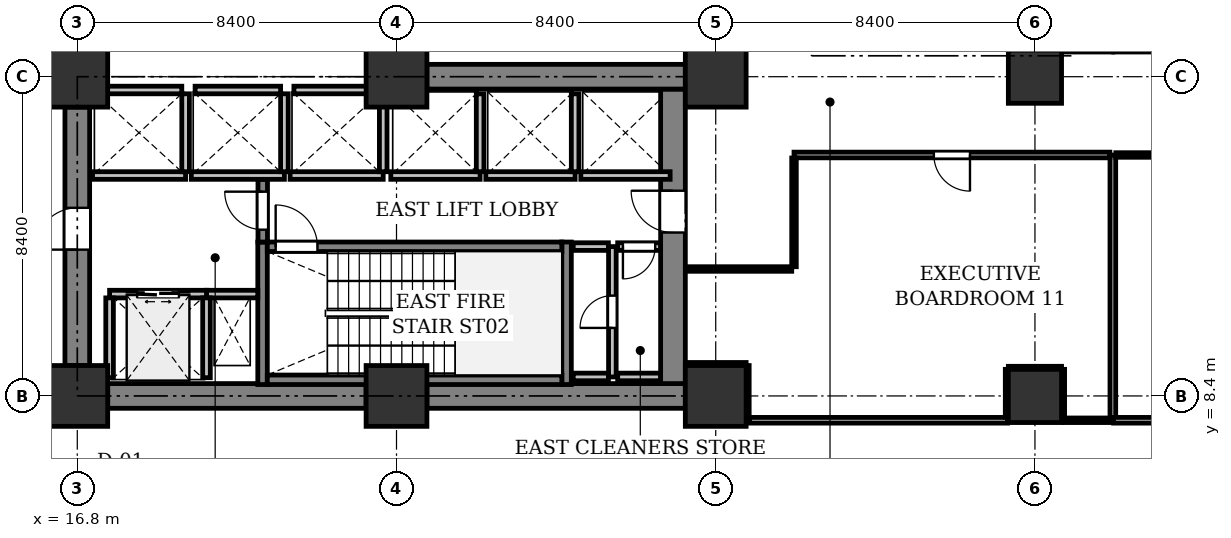
"""IFC4 building model, lengths in metres.
Left out: names, types, materials, properties, quantities, classifications, styles, units other than length and angle.
Written with IfcOpenShell. Run it as: python <this file> out.ifc"""

import sys

from ifc_helpers import new_model, si_unit, direction, frame, frame_2d, origin, origin_2d, place, context, subcontext, project, spatial, rectangle, extrude, element, fill, save


model = new_model("IFC4")
c1 = context("Model", 3, precision=1e-05, world=origin(), true_north=direction((0.0, 1.0)))
c2 = subcontext(c1, "Body", "Model", "MODEL_VIEW")
j1 = project(units=[si_unit("LENGTHUNIT", "METRE"), si_unit("PLANEANGLEUNIT", "RADIAN")], contexts=[c1])
p1 = place(None, origin())
s1 = spatial("IfcSite", under=j1, at=p1, CompositionType="ELEMENT")
p2 = place(p1, origin())
s2 = spatial("IfcBuilding", under=s1, at=p2, CompositionType="ELEMENT")
p3 = place(p2, frame((0.0, 0.0, 10.2)))
s3 = spatial("IfcBuildingStorey", under=s2, at=p3, CompositionType="ELEMENT", Elevation=10.2)
for number, where, z_axis, x_axis in (
    (1, (16.8, 8.4, 0.0), (0.0, 0.0, 1.0), (1.0, 0.0, 0.0)),
    (2, (16.8, 16.8, 0.0), (0.0, 0.0, 1.0), (1.0, 0.0, 0.0)),
    (3, (25.2, 8.4, 0.0), (0.0, 0.0, 1.0), (1.0, 0.0, 0.0)),
    (4, (25.2, 16.8, 0.0), (0.0, 0.0, 1.0), (1.0, 0.0, 0.0)),
    (5, (33.6, 8.4, 0.0), (0.0, 0.0, 1.0), (1.0, 0.0, 0.0)),
    (6, (33.6, 16.8, 0.0), (0.0, 0.0, 1.0), (1.0, 0.0, 0.0)),
):
    element("IfcColumn", number, at=place(p3, frame(where, z_axis=z_axis, x_axis=x_axis)), inside=s3, PredefinedType="COLUMN", context=c2, shape_type="SweptSolid", body=[
        extrude(rectangle(XDim=1.6, YDim=1.6, at=origin_2d()), origin(), (0.0, 0.0, 1.0), 4.8),
    ])
for number, where, z_axis, x_axis in (
    (7, (42.0, 8.4, 0.0), (0.0, 0.0, 1.0), (1.0, 0.0, 0.0)),
    (8, (42.0, 16.8, 0.0), (0.0, 0.0, 1.0), (1.0, 0.0, 0.0)),
):
    element("IfcColumn", number, at=place(p3, frame(where, z_axis=z_axis, x_axis=x_axis)), inside=s3, PredefinedType="COLUMN", context=c2, shape_type="SweptSolid", body=[
        extrude(rectangle(XDim=1.4, YDim=1.4, at=origin_2d()), origin(), (0.0, 0.0, 1.0), 4.8),
    ])
p4 = place(p3, frame((17.6, 8.4, 0.0), z_axis=(0.0, 0.0, 1.0), x_axis=(1.0, 0.0, 0.0)))
e9 = element("IfcWall", 9, at=p4, inside=s3, PredefinedType="SHEAR", context=c2, shape_type="SweptSolid", body=[
    extrude(rectangle(XDim=6.8, YDim=0.65, at=frame_2d((3.4, 0.0))), origin(), (0.0, 0.0, 1.0), 4.525),
])
p5 = place(p3, frame((26.0, 8.4, 0.0), z_axis=(0.0, 0.0, 1.0), x_axis=(1.0, 0.0, 0.0)))
e10 = element("IfcWall", 10, at=p5, inside=s3, PredefinedType="SHEAR", context=c2, shape_type="SweptSolid", body=[
    extrude(rectangle(XDim=6.8, YDim=0.65, at=frame_2d((3.4, 0.0))), origin(), (0.0, 0.0, 1.0), 4.525),
])
p6 = place(p3, frame((32.475, 8.725, 0.0), z_axis=(0.0, 0.0, 1.0), x_axis=(0.0, 1.0, 0.0)))
e11 = element("IfcWall", 11, at=p6, inside=s3, PredefinedType="SHEAR", context=c2, shape_type="SweptSolid", body=[
    extrude(rectangle(XDim=7.75, YDim=0.65, at=frame_2d((3.875, 0.0))), origin(), (0.0, 0.0, 1.0), 4.525),
])
p7 = place(p6, frame((3.975, 0.0, 0.0)))
e12 = element("IfcOpeningElement", 12, at=p7, cuts=e11, PredefinedType="OPENING", context=c2, shape_type="SweptSolid", body=[
    extrude(rectangle(XDim=1.1, YDim=2.15, at=frame_2d((0.55, 1.075))), frame((0.0, 0.335, 0.0), z_axis=(0.0, -1.0, 0.0), x_axis=(1.0, 0.0, 0.0)), (0.0, 0.0, 1.0), 0.67),
])
p8 = place(p3, frame((16.8, 9.2, 0.0), z_axis=(0.0, 0.0, 1.0), x_axis=(0.0, 1.0, 0.0)))
e13 = element("IfcWall", 13, at=p8, inside=s3, PredefinedType="SHEAR", context=c2, shape_type="SweptSolid", body=[
    extrude(rectangle(XDim=6.8, YDim=0.65, at=frame_2d((3.4, 0.0))), origin(), (0.0, 0.0, 1.0), 4.525),
])
p9 = place(p8, frame((3.05, 0.0, 0.0)))
e14 = element("IfcOpeningElement", 14, at=p9, cuts=e13, PredefinedType="OPENING", context=c2, shape_type="SweptSolid", body=[
    extrude(rectangle(XDim=1.1, YDim=2.15, at=frame_2d((0.55, 1.075))), frame((0.0, 0.335, 0.0), z_axis=(0.0, -1.0, 0.0), x_axis=(1.0, 0.0, 0.0)), (0.0, 0.0, 1.0), 0.67),
])
p10 = place(p3, frame((26.0, 16.8, 0.0), z_axis=(0.0, 0.0, 1.0), x_axis=(1.0, 0.0, 0.0)))
e15 = element("IfcWall", 15, at=p10, inside=s3, PredefinedType="SHEAR", context=c2, shape_type="SweptSolid", body=[
    extrude(rectangle(XDim=6.8, YDim=0.65, at=frame_2d((3.4, 0.0))), origin(), (0.0, 0.0, 1.0), 4.525),
])
for number, where, z_axis, x_axis in (
    (16, (21.675, 8.7, 0.0), (0.0, 0.0, 1.0), (0.0, 1.0, 0.0)),
    (17, (29.675, 8.7, 0.0), (0.0, 0.0, 1.0), (0.0, 1.0, 0.0)),
):
    element("IfcWall", number, at=place(p3, frame(where, z_axis=z_axis, x_axis=x_axis)), inside=s3, PredefinedType="SHEAR", context=c2, shape_type="SweptSolid", body=[
        extrude(rectangle(XDim=3.75, YDim=0.25, at=frame_2d((1.875, 0.0))), origin(), (0.0, 0.0, 1.0), 4.525),
    ])
p11 = place(p3, frame((21.8, 8.825, 0.0), z_axis=(0.0, 0.0, 1.0), x_axis=(1.0, 0.0, 0.0)))
e18 = element("IfcWall", 18, at=p11, inside=s3, PredefinedType="SHEAR", context=c2, shape_type="SweptSolid", body=[
    extrude(rectangle(XDim=7.75, YDim=0.25, at=frame_2d((3.875, 0.0))), origin(), (0.0, 0.0, 1.0), 4.525),
])
p12 = place(p3, frame((21.8, 12.325, 0.0), z_axis=(0.0, 0.0, 1.0), x_axis=(1.0, 0.0, 0.0)))
e19 = element("IfcWall", 19, at=p12, inside=s3, PredefinedType="SHEAR", context=c2, shape_type="SweptSolid", body=[
    extrude(rectangle(XDim=7.75, YDim=0.25, at=frame_2d((3.875, 0.0))), origin(), (0.0, 0.0, 1.0), 4.525),
])
p13 = place(p12, frame((0.22, 0.0, 0.0)))
e20 = element("IfcOpeningElement", 20, at=p13, cuts=e19, PredefinedType="OPENING", context=c2, shape_type="SweptSolid", body=[
    extrude(rectangle(XDim=1.1, YDim=2.15, at=frame_2d((0.55, 1.075))), frame((0.0, 0.135, 0.0), z_axis=(0.0, -1.0, 0.0), x_axis=(1.0, 0.0, 0.0)), (0.0, 0.0, 1.0), 0.27),
])
p14 = place(p3, frame((20.2, 11.08, 0.0), z_axis=(0.0, 0.0, 1.0), x_axis=(1.0, 0.0, 0.0)))
e21 = element("IfcWall", 21, at=p14, inside=s3, PredefinedType="PARTITIONING", context=c2, shape_type="SweptSolid", body=[
    extrude(rectangle(XDim=1.35, YDim=0.2, at=frame_2d((0.675, 0.0))), origin(), (0.0, 0.0, 1.0), 4.525),
])
p15 = place(p3, frame((21.68, 12.45, 0.0), z_axis=(0.0, 0.0, 1.0), x_axis=(0.0, 1.0, 0.0)))
e22 = element("IfcWall", 22, at=p15, inside=s3, PredefinedType="SHEAR", context=c2, shape_type="SweptSolid", body=[
    extrude(rectangle(XDim=1.65, YDim=0.25, at=frame_2d((0.825, 0.0))), origin(), (0.0, 0.0, 1.0), 4.525),
])
p16 = place(p15, frame((0.325, 0.0, 0.0)))
e23 = element("IfcOpeningElement", 23, at=p16, cuts=e22, PredefinedType="OPENING", context=c2, shape_type="SweptSolid", body=[
    extrude(rectangle(XDim=1.0, YDim=2.15, at=frame_2d((0.5, 1.075))), frame((0.0, 0.135, 0.0), z_axis=(0.0, -1.0, 0.0), x_axis=(1.0, 0.0, 0.0)), (0.0, 0.0, 1.0), 0.27),
])
p17 = place(p3, frame((17.65, 11.08, 0.0), z_axis=(0.0, 0.0, 1.0), x_axis=(1.0, 0.0, 0.0)))
e24 = element("IfcWall", 24, at=p17, inside=s3, PredefinedType="PARTITIONING", context=c2, shape_type="SweptSolid", body=[
    extrude(rectangle(XDim=2.55, YDim=0.2, at=frame_2d((1.275, 0.0))), origin(), (0.0, 0.0, 1.0), 4.525),
])
p18 = place(p17, frame((0.725, 0.0, 0.0)))
e25 = element("IfcOpeningElement", 25, at=p18, cuts=e24, PredefinedType="OPENING", context=c2, shape_type="SweptSolid", body=[
    extrude(rectangle(XDim=1.1, YDim=2.2, at=frame_2d((0.55, 1.1))), frame((0.0, 0.11, 0.0), z_axis=(0.0, -1.0, 0.0), x_axis=(1.0, 0.0, 0.0)), (0.0, 0.0, 1.0), 0.22),
])
for number, where, z_axis, x_axis in (
    (26, (20.2, 8.88, 0.0), (0.0, 0.0, 1.0), (0.0, 1.0, 0.0)),
    (27, (17.65, 8.88, 0.0), (0.0, 0.0, 1.0), (0.0, 1.0, 0.0)),
):
    element("IfcWall", number, at=place(p3, frame(where, z_axis=z_axis, x_axis=x_axis)), inside=s3, PredefinedType="PARTITIONING", context=c2, shape_type="SweptSolid", body=[
        extrude(rectangle(XDim=2.1, YDim=0.2, at=frame_2d((1.05, 0.0))), origin(), (0.0, 0.0, 1.0), 4.525),
    ])
p19 = place(p3, frame((17.2, 14.2, 0.0), z_axis=(0.0, 0.0, 1.0), x_axis=(1.0, 0.0, 0.0)))
e28 = element("IfcWall", 28, at=p19, inside=s3, PredefinedType="PARTITIONING", context=c2, shape_type="SweptSolid", body=[
    extrude(rectangle(XDim=2.45, YDim=0.2, at=frame_2d((1.225, 0.0))), origin(), (0.0, 0.0, 1.0), 4.525),
])
p20 = place(p3, frame((19.65, 14.3, 0.0), z_axis=(0.0, 0.0, 1.0), x_axis=(0.0, 1.0, 0.0)))
e29 = element("IfcWall", 29, at=p20, inside=s3, PredefinedType="PARTITIONING", context=c2, shape_type="SweptSolid", body=[
    extrude(rectangle(XDim=2.05, YDim=0.2, at=frame_2d((1.025, 0.0))), origin(), (0.0, 0.0, 1.0), 4.525),
])
p21 = place(p3, frame((17.3, 16.45, 0.0), z_axis=(0.0, 0.0, 1.0), x_axis=(1.0, 0.0, 0.0)))
e30 = element("IfcWall", 30, at=p21, inside=s3, PredefinedType="PARTITIONING", context=c2, shape_type="SweptSolid", body=[
    extrude(rectangle(XDim=2.25, YDim=0.2, at=frame_2d((1.125, 0.0))), origin(), (0.0, 0.0, 1.0), 4.525),
])
p22 = place(p3, frame((19.8, 14.2, 0.0), z_axis=(0.0, 0.0, 1.0), x_axis=(1.0, 0.0, 0.0)))
e31 = element("IfcWall", 31, at=p22, inside=s3, PredefinedType="PARTITIONING", context=c2, shape_type="SweptSolid", body=[
    extrude(rectangle(XDim=2.45, YDim=0.2, at=frame_2d((1.225, 0.0))), origin(), (0.0, 0.0, 1.0), 4.525),
])
p23 = place(p3, frame((22.25, 14.3, 0.0), z_axis=(0.0, 0.0, 1.0), x_axis=(0.0, 1.0, 0.0)))
e32 = element("IfcWall", 32, at=p23, inside=s3, PredefinedType="PARTITIONING", context=c2, shape_type="SweptSolid", body=[
    extrude(rectangle(XDim=2.05, YDim=0.2, at=frame_2d((1.025, 0.0))), origin(), (0.0, 0.0, 1.0), 4.525),
])
p24 = place(p3, frame((19.9, 16.45, 0.0), z_axis=(0.0, 0.0, 1.0), x_axis=(1.0, 0.0, 0.0)))
e33 = element("IfcWall", 33, at=p24, inside=s3, PredefinedType="PARTITIONING", context=c2, shape_type="SweptSolid", body=[
    extrude(rectangle(XDim=2.25, YDim=0.2, at=frame_2d((1.125, 0.0))), origin(), (0.0, 0.0, 1.0), 4.525),
])
p25 = place(p3, frame((22.4, 14.2, 0.0), z_axis=(0.0, 0.0, 1.0), x_axis=(1.0, 0.0, 0.0)))
e34 = element("IfcWall", 34, at=p25, inside=s3, PredefinedType="PARTITIONING", context=c2, shape_type="SweptSolid", body=[
    extrude(rectangle(XDim=2.45, YDim=0.2, at=frame_2d((1.225, 0.0))), origin(), (0.0, 0.0, 1.0), 4.525),
])
p26 = place(p3, frame((24.85, 14.3, 0.0), z_axis=(0.0, 0.0, 1.0), x_axis=(0.0, 1.0, 0.0)))
e35 = element("IfcWall", 35, at=p26, inside=s3, PredefinedType="PARTITIONING", context=c2, shape_type="SweptSolid", body=[
    extrude(rectangle(XDim=2.05, YDim=0.2, at=frame_2d((1.025, 0.0))), origin(), (0.0, 0.0, 1.0), 4.525),
])
p27 = place(p3, frame((22.5, 16.45, 0.0), z_axis=(0.0, 0.0, 1.0), x_axis=(1.0, 0.0, 0.0)))
e36 = element("IfcWall", 36, at=p27, inside=s3, PredefinedType="PARTITIONING", context=c2, shape_type="SweptSolid", body=[
    extrude(rectangle(XDim=2.25, YDim=0.2, at=frame_2d((1.125, 0.0))), origin(), (0.0, 0.0, 1.0), 4.525),
])
p28 = place(p3, frame((25.05, 14.2, 0.0), z_axis=(0.0, 0.0, 1.0), x_axis=(1.0, 0.0, 0.0)))
e37 = element("IfcWall", 37, at=p28, inside=s3, PredefinedType="PARTITIONING", context=c2, shape_type="SweptSolid", body=[
    extrude(rectangle(XDim=2.35, YDim=0.2, at=frame_2d((1.175, 0.0))), origin(), (0.0, 0.0, 1.0), 4.525),
])
p29 = place(p3, frame((27.4, 14.3, 0.0), z_axis=(0.0, 0.0, 1.0), x_axis=(0.0, 1.0, 0.0)))
e38 = element("IfcWall", 38, at=p29, inside=s3, PredefinedType="PARTITIONING", context=c2, shape_type="SweptSolid", body=[
    extrude(rectangle(XDim=2.05, YDim=0.2, at=frame_2d((1.025, 0.0))), origin(), (0.0, 0.0, 1.0), 4.525),
])
p30 = place(p3, frame((27.55, 14.2, 0.0), z_axis=(0.0, 0.0, 1.0), x_axis=(1.0, 0.0, 0.0)))
e39 = element("IfcWall", 39, at=p30, inside=s3, PredefinedType="PARTITIONING", context=c2, shape_type="SweptSolid", body=[
    extrude(rectangle(XDim=2.35, YDim=0.2, at=frame_2d((1.175, 0.0))), origin(), (0.0, 0.0, 1.0), 4.525),
])
p31 = place(p3, frame((29.9, 14.3, 0.0), z_axis=(0.0, 0.0, 1.0), x_axis=(0.0, 1.0, 0.0)))
e40 = element("IfcWall", 40, at=p31, inside=s3, PredefinedType="PARTITIONING", context=c2, shape_type="SweptSolid", body=[
    extrude(rectangle(XDim=2.05, YDim=0.2, at=frame_2d((1.025, 0.0))), origin(), (0.0, 0.0, 1.0), 4.525),
])
p32 = place(p3, frame((30.05, 14.2, 0.0), z_axis=(0.0, 0.0, 1.0), x_axis=(1.0, 0.0, 0.0)))
e41 = element("IfcWall", 41, at=p32, inside=s3, PredefinedType="PARTITIONING", context=c2, shape_type="SweptSolid", body=[
    extrude(rectangle(XDim=2.35, YDim=0.2, at=frame_2d((1.175, 0.0))), origin(), (0.0, 0.0, 1.0), 4.525),
])
p33 = place(p3, frame((30.88, 8.9, 0.0), z_axis=(0.0, 0.0, 1.0), x_axis=(0.0, 1.0, 0.0)))
e42 = element("IfcWall", 42, at=p33, inside=s3, PredefinedType="PARTITIONING", context=c2, shape_type="SweptSolid", body=[
    extrude(rectangle(XDim=3.43, YDim=0.2, at=frame_2d((1.715, 0.0))), origin(), (0.0, 0.0, 1.0), 4.525),
])
p34 = place(p33, frame((1.29, 0.0, 0.0)))
e43 = element("IfcOpeningElement", 43, at=p34, cuts=e42, PredefinedType="OPENING", context=c2, shape_type="SweptSolid", body=[
    extrude(rectangle(XDim=0.85, YDim=2.15, at=frame_2d((0.425, 1.075))), frame((0.0, 0.11, 0.0), z_axis=(0.0, -1.0, 0.0), x_axis=(1.0, 0.0, 0.0)), (0.0, 0.0, 1.0), 0.22),
])
for number, where, z_axis, x_axis in (
    (44, (30.776, 12.33, 0.0), (0.0, 0.0, 1.0), (-1.0, 0.0, 0.0)),
    (45, (29.85, 8.9, 0.0), (0.0, 0.0, 1.0), (1.0, 0.0, 0.0)),
):
    element("IfcWall", number, at=place(p3, frame(where, z_axis=z_axis, x_axis=x_axis)), inside=s3, PredefinedType="PARTITIONING", context=c2, shape_type="SweptSolid", body=[
        extrude(rectangle(XDim=0.926, YDim=0.2, at=frame_2d((0.463, 0.0))), origin(), (0.0, 0.0, 1.0), 4.525),
    ])
p35 = place(p3, frame((32.146, 12.33, 0.0), z_axis=(0.0, 0.0, 1.0), x_axis=(-1.0, 0.0, 0.0)))
e46 = element("IfcWall", 46, at=p35, inside=s3, PredefinedType="PARTITIONING", context=c2, shape_type="SweptSolid", body=[
    extrude(rectangle(XDim=1.126, YDim=0.2, at=frame_2d((0.563, 0.0))), origin(), (0.0, 0.0, 1.0), 4.525),
])
p36 = place(p35, frame((0.138, 0.0, 0.0)))
e47 = element("IfcOpeningElement", 47, at=p36, cuts=e46, PredefinedType="OPENING", context=c2, shape_type="SweptSolid", body=[
    extrude(rectangle(XDim=0.85, YDim=2.15, at=frame_2d((0.425, 1.075))), frame((0.0, 0.11, 0.0), z_axis=(0.0, -1.0, 0.0), x_axis=(1.0, 0.0, 0.0)), (0.0, 0.0, 1.0), 0.22),
])
p37 = place(p3, frame((31.02, 8.9, 0.0), z_axis=(0.0, 0.0, 1.0), x_axis=(1.0, 0.0, 0.0)))
e48 = element("IfcWall", 48, at=p37, inside=s3, PredefinedType="PARTITIONING", context=c2, shape_type="SweptSolid", body=[
    extrude(rectangle(XDim=1.126, YDim=0.2, at=frame_2d((0.563, 0.0))), origin(), (0.0, 0.0, 1.0), 4.525),
])
p38 = place(p3, frame((32.804, 9.22, 0.0), z_axis=(0.0, 0.0, 1.0), x_axis=(1.0, 0.0, 0.0)))
e49 = element("IfcWall", 49, at=p38, inside=s3, PredefinedType="PARTITIONING", context=c2, shape_type="SweptSolid", body=[
    extrude(rectangle(XDim=1.596, YDim=0.12, at=frame_2d((0.798, 0.0))), origin(), (0.0, 0.0, 1.0), 3.913),
])
p39 = place(p3, frame((34.42, 9.2, 0.0), z_axis=(0.0, 0.0, 1.0), x_axis=(0.0, -1.0, 0.0)))
e50 = element("IfcWall", 50, at=p39, inside=s3, PredefinedType="PARTITIONING", context=c2, shape_type="SweptSolid", body=[
    extrude(rectangle(XDim=1.44, YDim=0.12, at=frame_2d((0.72, 0.0))), origin(), (0.0, 0.0, 1.0), 3.725),
])
p40 = place(p3, frame((34.484, 7.76, 0.0), z_axis=(0.0, 0.0, 1.0), x_axis=(1.0, 0.0, 0.0)))
e51 = element("IfcWall", 51, at=p40, inside=s3, PredefinedType="PARTITIONING", context=c2, shape_type="SweptSolid", body=[
    extrude(rectangle(XDim=6.796, YDim=0.15, at=frame_2d((3.398, 0.0))), origin(), (0.0, 0.0, 1.0), 4.122),
])
p41 = place(p3, frame((41.28, 7.839, 0.0), z_axis=(0.0, 0.0, 1.0), x_axis=(0.0, 1.0, 0.0)))
e52 = element("IfcWall", 52, at=p41, inside=s3, PredefinedType="PARTITIONING", context=c2, shape_type="SweptSolid", body=[
    extrude(rectangle(XDim=1.261, YDim=0.12, at=frame_2d((0.63, 0.0))), origin(), (0.0, 0.0, 1.0), 3.725),
])
p42 = place(p3, frame((41.3, 9.12, 0.0), z_axis=(0.0, 0.0, 1.0), x_axis=(1.0, 0.0, 0.0)))
e53 = element("IfcWall", 53, at=p42, inside=s3, PredefinedType="PARTITIONING", context=c2, shape_type="SweptSolid", body=[
    extrude(rectangle(XDim=1.4, YDim=0.12, at=frame_2d((0.7, 0.0))), origin(), (0.0, 0.0, 1.0), 3.913),
])
p43 = place(p3, frame((42.72, 9.1, 0.0), z_axis=(0.0, 0.0, 1.0), x_axis=(0.0, -1.0, 0.0)))
e54 = element("IfcWall", 54, at=p43, inside=s3, PredefinedType="PARTITIONING", context=c2, shape_type="SweptSolid", body=[
    extrude(rectangle(XDim=1.34, YDim=0.12, at=frame_2d((0.67, 0.0))), origin(), (0.0, 0.0, 1.0), 3.725),
])
p44 = place(p3, frame((42.784, 7.76, 0.0), z_axis=(0.0, 0.0, 1.0), x_axis=(1.0, 0.0, 0.0)))
e55 = element("IfcWall", 55, at=p44, inside=s3, PredefinedType="PARTITIONING", context=c2, shape_type="SweptSolid", body=[
    extrude(rectangle(XDim=1.266, YDim=0.12, at=frame_2d((0.633, 0.0))), origin(), (0.0, 0.0, 1.0), 4.525),
])
p45 = place(p3, frame((44.05, 7.824, 0.0), z_axis=(0.0, 0.0, 1.0), x_axis=(0.0, 1.0, 0.0)))
e56 = element("IfcWall", 56, at=p45, inside=s3, PredefinedType="PARTITIONING", context=c2, shape_type="SweptSolid", body=[
    extrude(rectangle(XDim=6.916, YDim=0.15, at=frame_2d((3.458, 0.0))), origin(), (0.0, 0.0, 1.0), 3.725),
])
p46 = place(p3, frame((43.971, 14.74, 0.0), z_axis=(0.0, 0.0, 1.0), x_axis=(-1.0, 0.0, 0.0)))
e57 = element("IfcWall", 57, at=p46, inside=s3, PredefinedType="PARTITIONING", context=c2, shape_type="SweptSolid", body=[
    extrude(rectangle(XDim=8.311, YDim=0.15, at=frame_2d((4.156, 0.0))), origin(), (0.0, 0.0, 1.0), 3.913),
])
p47 = place(p46, frame((3.68, 0.0, 0.0)))
e58 = element("IfcOpeningElement", 58, at=p47, cuts=e57, PredefinedType="OPENING", context=c2, shape_type="SweptSolid", body=[
    extrude(rectangle(XDim=0.95, YDim=2.15, at=frame_2d((0.475, 1.075))), frame((0.0, 0.085, 0.0), z_axis=(0.0, -1.0, 0.0), x_axis=(1.0, 0.0, 0.0)), (0.0, 0.0, 1.0), 0.17),
])
p48 = place(p3, frame((35.66, 14.661, 0.0), z_axis=(0.0, 0.0, 1.0), x_axis=(0.0, -1.0, 0.0)))
e59 = element("IfcWall", 59, at=p48, inside=s3, PredefinedType="PARTITIONING", context=c2, shape_type="SweptSolid", body=[
    extrude(rectangle(XDim=2.861, YDim=0.12, at=frame_2d((1.43, 0.0))), origin(), (0.0, 0.0, 1.0), 4.525),
])
p49 = place(p3, frame((35.6, 11.74, 0.0), z_axis=(0.0, 0.0, 1.0), x_axis=(-1.0, 0.0, 0.0)))
e60 = element("IfcWall", 60, at=p49, inside=s3, PredefinedType="PARTITIONING", context=c2, shape_type="SweptSolid", body=[
    extrude(rectangle(XDim=2.796, YDim=0.12, at=frame_2d((1.398, 0.0))), origin(), (0.0, 0.0, 1.0), 3.913),
])
p50 = place(p3, frame((45.4, 14.74, 0.0), z_axis=(0.0, 0.0, 1.0), x_axis=(-1.0, 0.0, 0.0)))
e61 = element("IfcWall", 61, at=p50, inside=s3, PredefinedType="PARTITIONING", context=c2, shape_type="SweptSolid", body=[
    extrude(rectangle(XDim=1.271, YDim=0.12, at=frame_2d((0.635, 0.0))), origin(), (0.0, 0.0, 1.0), 4.525),
])
p51 = place(p3, frame((44.07, 7.76, 0.0), z_axis=(0.0, 0.0, 1.0), x_axis=(1.0, 0.0, 0.0)))
e62 = element("IfcWall", 62, at=p51, inside=s3, PredefinedType="PARTITIONING", context=c2, shape_type="SweptSolid", body=[
    extrude(rectangle(XDim=5.61, YDim=0.15, at=frame_2d((2.805, 0.0))), origin(), (0.0, 0.0, 1.0), 4.122),
])
p52 = place(p7, origin())
e63 = element("IfcDoor", 63, at=p52, inside=s3, OperationType="SINGLE_SWING_RIGHT", PredefinedType="DOOR", context=c2, shape_type="SweptSolid", body=[
    extrude(rectangle(XDim=1.1, YDim=2.15, at=frame_2d((0.55, 1.075))), frame((0.0, 0.025, 0.0), z_axis=(0.0, -1.0, 0.0), x_axis=(1.0, 0.0, 0.0)), (0.0, 0.0, 1.0), 0.05),
])
fill(e12, e63)
p53 = place(p9, origin())
e64 = element("IfcDoor", 64, at=p53, inside=s3, OperationType="SINGLE_SWING_LEFT", PredefinedType="DOOR", context=c2, shape_type="SweptSolid", body=[
    extrude(rectangle(XDim=1.1, YDim=2.15, at=frame_2d((0.55, 1.075))), frame((0.0, 0.025, 0.0), z_axis=(0.0, -1.0, 0.0), x_axis=(1.0, 0.0, 0.0)), (0.0, 0.0, 1.0), 0.05),
])
fill(e14, e64)
p54 = place(p13, origin())
e65 = element("IfcDoor", 65, at=p54, inside=s3, OperationType="SINGLE_SWING_LEFT", PredefinedType="DOOR", context=c2, shape_type="SweptSolid", body=[
    extrude(rectangle(XDim=1.1, YDim=2.15, at=frame_2d((0.55, 1.075))), frame((0.0, 0.025, 0.0), z_axis=(0.0, -1.0, 0.0), x_axis=(1.0, 0.0, 0.0)), (0.0, 0.0, 1.0), 0.05),
])
fill(e20, e65)
p55 = place(p16, origin())
e66 = element("IfcDoor", 66, at=p55, inside=s3, OperationType="SINGLE_SWING_RIGHT", PredefinedType="DOOR", context=c2, shape_type="SweptSolid", body=[
    extrude(rectangle(XDim=1.0, YDim=2.15, at=frame_2d((0.5, 1.075))), frame((0.0, 0.025, 0.0), z_axis=(0.0, -1.0, 0.0), x_axis=(1.0, 0.0, 0.0)), (0.0, 0.0, 1.0), 0.05),
])
fill(e23, e66)
p56 = place(p18, origin())
e67 = element("IfcDoor", 67, at=p56, inside=s3, OperationType="DOUBLE_DOOR_SLIDING", PredefinedType="DOOR", context=c2, shape_type="SweptSolid", body=[
    extrude(rectangle(XDim=1.1, YDim=2.2, at=frame_2d((0.55, 1.1))), frame((0.0, 0.025, 0.0), z_axis=(0.0, -1.0, 0.0), x_axis=(1.0, 0.0, 0.0)), (0.0, 0.0, 1.0), 0.05),
])
fill(e25, e67)
p57 = place(p34, origin())
e68 = element("IfcDoor", 68, at=p57, inside=s3, OperationType="SINGLE_SWING_LEFT", PredefinedType="DOOR", context=c2, shape_type="SweptSolid", body=[
    extrude(rectangle(XDim=0.85, YDim=2.15, at=frame_2d((0.425, 1.075))), frame((0.0, 0.025, 0.0), z_axis=(0.0, -1.0, 0.0), x_axis=(1.0, 0.0, 0.0)), (0.0, 0.0, 1.0), 0.05),
])
fill(e43, e68)
p58 = place(p36, origin())
e69 = element("IfcDoor", 69, at=p58, inside=s3, OperationType="SINGLE_SWING_RIGHT", PredefinedType="DOOR", context=c2, shape_type="SweptSolid", body=[
    extrude(rectangle(XDim=0.85, YDim=2.15, at=frame_2d((0.425, 1.075))), frame((0.0, 0.025, 0.0), z_axis=(0.0, -1.0, 0.0), x_axis=(1.0, 0.0, 0.0)), (0.0, 0.0, 1.0), 0.05),
])
fill(e47, e69)
p59 = place(p47, origin())
e70 = element("IfcDoor", 70, at=p59, inside=s3, OperationType="SINGLE_SWING_LEFT", PredefinedType="DOOR", context=c2, shape_type="SweptSolid", body=[
    extrude(rectangle(XDim=0.95, YDim=2.15, at=frame_2d((0.475, 1.075))), frame((0.0, 0.025, 0.0), z_axis=(0.0, -1.0, 0.0), x_axis=(1.0, 0.0, 0.0)), (0.0, 0.0, 1.0), 0.05),
])
fill(e58, e70)
save(model, sys.argv[1])
